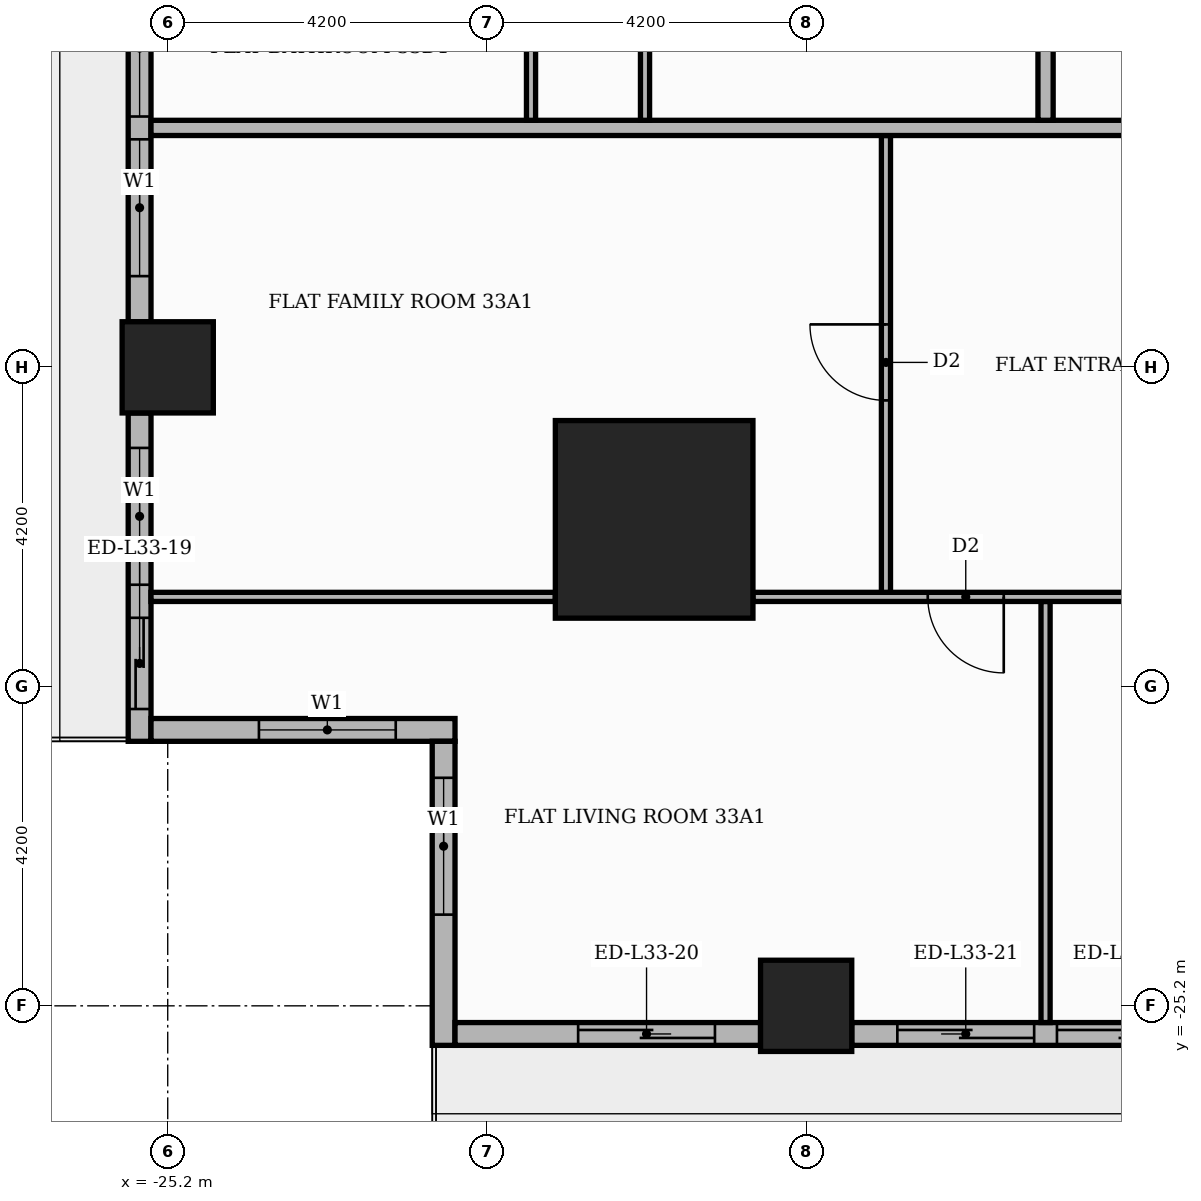
"""IFC4 building model, lengths in metres.
Left out: names, types, materials, properties, quantities, classifications, styles, units other than length and angle.
Written with IfcOpenShell. Run it as: python <this file> out.ifc"""

import sys

from ifc_helpers import new_model, si_unit, direction, frame, frame_2d, origin, origin_2d, place, context, subcontext, project, spatial, rectangle, extrude, element, fill, save


model = new_model("IFC4")
c1 = context("Model", 3, precision=1e-05, world=origin(), true_north=direction((0.0, 1.0)))
c2 = subcontext(c1, "Body", "Model", "MODEL_VIEW")
j1 = project(units=[si_unit("LENGTHUNIT", "METRE"), si_unit("PLANEANGLEUNIT", "RADIAN")], contexts=[c1])
p1 = place(None, origin())
s1 = spatial("IfcSite", under=j1, at=p1, CompositionType="ELEMENT")
p2 = place(p1, origin())
s2 = spatial("IfcBuilding", under=s1, at=p2, CompositionType="ELEMENT")
p3 = place(p2, frame((0.0, 0.0, 141.6)))
s3 = spatial("IfcBuildingStorey", under=s2, at=p3, CompositionType="ELEMENT", Elevation=141.6)
p4 = place(p3, frame((-18.8, -18.8, 0.0), z_axis=(0.0, 0.0, 1.0), x_axis=(1.0, 0.0, 0.0)))
e1 = element("IfcColumn", 1, at=p4, inside=s3, PredefinedType="COLUMN", context=c2, shape_type="SweptSolid", body=[
    extrude(rectangle(XDim=2.6, YDim=2.6, at=origin_2d()), origin(), (0.0, 0.0, 1.0), 3.9),
])
for number, where, z_axis, x_axis in (
    (2, (-16.8, -25.2, 0.0), (0.0, 0.0, 1.0), (1.0, 0.0, 0.0)),
    (3, (-25.2, -16.8, 0.0), (0.0, 0.0, 1.0), (1.0, 0.0, 0.0)),
):
    element("IfcColumn", number, at=place(p3, frame(where, z_axis=z_axis, x_axis=x_axis)), inside=s3, PredefinedType="COLUMN", context=c2, shape_type="SweptSolid", body=[
        extrude(rectangle(XDim=1.2, YDim=1.2, at=origin_2d()), origin(), (0.0, 0.0, 1.0), 3.9),
    ])
p5 = place(p3, frame((-25.57, -9.0, 0.0), z_axis=(0.0, 0.0, 1.0), x_axis=(0.0, -1.0, 0.0)))
e4 = element("IfcWall", 4, at=p5, inside=s3, PredefinedType="STANDARD", context=c2, shape_type="SweptSolid", body=[
    extrude(rectangle(XDim=7.2, YDim=0.3, at=frame_2d((3.6, 0.0))), origin(), (0.0, 0.0, 1.0), 3.48),
])
p6 = place(p5, frame((0.6, 0.0, 0.9)))
e5 = element("IfcOpeningElement", 5, at=p6, cuts=e4, PredefinedType="OPENING", context=c2, shape_type="SweptSolid", body=[
    extrude(rectangle(XDim=1.8, YDim=2.1, at=frame_2d((0.9, 1.05))), frame((0.0, 0.16, 0.0), z_axis=(0.0, -1.0, 0.0), x_axis=(1.0, 0.0, 0.0)), (0.0, 0.0, 1.0), 0.32),
])
p7 = place(p5, frame((2.7, 0.0, 0.9)))
e6 = element("IfcOpeningElement", 6, at=p7, cuts=e4, PredefinedType="OPENING", context=c2, shape_type="SweptSolid", body=[
    extrude(rectangle(XDim=1.8, YDim=2.1, at=frame_2d((0.9, 1.05))), frame((0.0, 0.16, 0.0), z_axis=(0.0, -1.0, 0.0), x_axis=(1.0, 0.0, 0.0)), (0.0, 0.0, 1.0), 0.32),
])
p8 = place(p5, frame((4.8, 0.0, 0.9)))
e7 = element("IfcOpeningElement", 7, at=p8, cuts=e4, PredefinedType="OPENING", context=c2, shape_type="SweptSolid", body=[
    extrude(rectangle(XDim=1.8, YDim=2.1, at=frame_2d((0.9, 1.05))), frame((0.0, 0.16, 0.0), z_axis=(0.0, -1.0, 0.0), x_axis=(1.0, 0.0, 0.0)), (0.0, 0.0, 1.0), 0.32),
])
p9 = place(p3, frame((-25.57, -17.4, 0.0), z_axis=(0.0, 0.0, 1.0), x_axis=(0.0, -1.0, 0.0)))
e8 = element("IfcWall", 8, at=p9, inside=s3, PredefinedType="STANDARD", context=c2, shape_type="SweptSolid", body=[
    extrude(rectangle(XDim=4.32, YDim=0.3, at=frame_2d((2.16, 0.0))), origin(), (0.0, 0.0, 1.0), 3.48),
])
p10 = place(p9, frame((2.695, 0.0, 0.0)))
e9 = element("IfcOpeningElement", 9, at=p10, cuts=e8, PredefinedType="OPENING", context=c2, shape_type="SweptSolid", body=[
    extrude(rectangle(XDim=1.2, YDim=2.4, at=frame_2d((0.6, 1.2))), frame((0.0, 0.16, 0.0), z_axis=(0.0, -1.0, 0.0), x_axis=(1.0, 0.0, 0.0)), (0.0, 0.0, 1.0), 0.32),
])
p11 = place(p9, frame((0.46, 0.0, 0.9)))
e10 = element("IfcOpeningElement", 10, at=p11, cuts=e8, PredefinedType="OPENING", context=c2, shape_type="SweptSolid", body=[
    extrude(rectangle(XDim=1.8, YDim=2.1, at=frame_2d((0.9, 1.05))), frame((0.0, 0.16, 0.0), z_axis=(0.0, -1.0, 0.0), x_axis=(1.0, 0.0, 0.0)), (0.0, 0.0, 1.0), 0.32),
])
p12 = place(p3, frame((-25.42, -21.57, 0.0), z_axis=(0.0, 0.0, 1.0), x_axis=(1.0, 0.0, 0.0)))
e11 = element("IfcWall", 11, at=p12, inside=s3, PredefinedType="STANDARD", context=c2, shape_type="SweptSolid", body=[
    extrude(rectangle(XDim=4.0, YDim=0.3, at=frame_2d((2.0, 0.0))), origin(), (0.0, 0.0, 1.0), 3.48),
])
p13 = place(p12, frame((1.42, 0.0, 0.9)))
e12 = element("IfcOpeningElement", 12, at=p13, cuts=e11, PredefinedType="OPENING", context=c2, shape_type="SweptSolid", body=[
    extrude(rectangle(XDim=1.8, YDim=2.1, at=frame_2d((0.9, 1.05))), frame((0.0, 0.16, 0.0), z_axis=(0.0, -1.0, 0.0), x_axis=(1.0, 0.0, 0.0)), (0.0, 0.0, 1.0), 0.32),
])
p14 = place(p3, frame((-21.57, -21.72, 0.0), z_axis=(0.0, 0.0, 1.0), x_axis=(0.0, -1.0, 0.0)))
e13 = element("IfcWall", 13, at=p14, inside=s3, PredefinedType="STANDARD", context=c2, shape_type="SweptSolid", body=[
    extrude(rectangle(XDim=4.0, YDim=0.3, at=frame_2d((2.0, 0.0))), origin(), (0.0, 0.0, 1.0), 3.48),
])
p15 = place(p14, frame((0.48, 0.0, 0.9)))
e14 = element("IfcOpeningElement", 14, at=p15, cuts=e13, PredefinedType="OPENING", context=c2, shape_type="SweptSolid", body=[
    extrude(rectangle(XDim=1.8, YDim=2.1, at=frame_2d((0.9, 1.05))), frame((0.0, 0.16, 0.0), z_axis=(0.0, -1.0, 0.0), x_axis=(1.0, 0.0, 0.0)), (0.0, 0.0, 1.0), 0.32),
])
p16 = place(p3, frame((-21.42, -25.57, 0.0), z_axis=(0.0, 0.0, 1.0), x_axis=(1.0, 0.0, 0.0)))
e15 = element("IfcWall", 15, at=p16, inside=s3, PredefinedType="STANDARD", context=c2, shape_type="SweptSolid", body=[
    extrude(rectangle(XDim=4.02, YDim=0.3, at=frame_2d((2.01, 0.0))), origin(), (0.0, 0.0, 1.0), 3.48),
])
p17 = place(p16, frame((1.62, 0.0, 0.0)))
e16 = element("IfcOpeningElement", 16, at=p17, cuts=e15, PredefinedType="OPENING", context=c2, shape_type="SweptSolid", body=[
    extrude(rectangle(XDim=1.8, YDim=2.4, at=frame_2d((0.9, 1.2))), frame((0.0, 0.16, 0.0), z_axis=(0.0, -1.0, 0.0), x_axis=(1.0, 0.0, 0.0)), (0.0, 0.0, 1.0), 0.32),
])
p18 = place(p3, frame((-16.2, -25.57, 0.0), z_axis=(0.0, 0.0, 1.0), x_axis=(1.0, 0.0, 0.0)))
e17 = element("IfcWall", 17, at=p18, inside=s3, PredefinedType="STANDARD", context=c2, shape_type="SweptSolid", body=[
    extrude(rectangle(XDim=7.2, YDim=0.3, at=frame_2d((3.6, 0.0))), origin(), (0.0, 0.0, 1.0), 3.48),
])
p19 = place(p18, frame((0.6, 0.0, 0.0)))
e18 = element("IfcOpeningElement", 18, at=p19, cuts=e17, PredefinedType="OPENING", context=c2, shape_type="SweptSolid", body=[
    extrude(rectangle(XDim=1.8, YDim=2.4, at=frame_2d((0.9, 1.2))), frame((0.0, 0.16, 0.0), z_axis=(0.0, -1.0, 0.0), x_axis=(1.0, 0.0, 0.0)), (0.0, 0.0, 1.0), 0.32),
])
p20 = place(p18, frame((2.7, 0.0, 0.0)))
e19 = element("IfcOpeningElement", 19, at=p20, cuts=e17, PredefinedType="OPENING", context=c2, shape_type="SweptSolid", body=[
    extrude(rectangle(XDim=1.8, YDim=2.4, at=frame_2d((0.9, 1.2))), frame((0.0, 0.16, 0.0), z_axis=(0.0, -1.0, 0.0), x_axis=(1.0, 0.0, 0.0)), (0.0, 0.0, 1.0), 0.32),
])
p21 = place(p18, frame((4.8, 0.0, 0.9)))
e20 = element("IfcOpeningElement", 20, at=p21, cuts=e17, PredefinedType="OPENING", context=c2, shape_type="SweptSolid", body=[
    extrude(rectangle(XDim=1.8, YDim=2.1, at=frame_2d((0.9, 1.05))), frame((0.0, 0.16, 0.0), z_axis=(0.0, -1.0, 0.0), x_axis=(1.0, 0.0, 0.0)), (0.0, 0.0, 1.0), 0.32),
])
p22 = place(p3, frame((-13.65, -25.42, 0.0), z_axis=(0.0, 0.0, 1.0), x_axis=(0.0, 1.0, 0.0)))
e21 = element("IfcWall", 21, at=p22, inside=s3, PredefinedType="PARTITIONING", context=c2, shape_type="SweptSolid", body=[
    extrude(rectangle(XDim=5.54, YDim=0.12, at=frame_2d((2.77, 0.0))), origin(), (0.0, 0.0, 1.0), 3.48),
])
p23 = place(p3, frame((-25.42, -19.82, 0.0), z_axis=(0.0, 0.0, 1.0), x_axis=(1.0, 0.0, 0.0)))
e22 = element("IfcWall", 22, at=p23, inside=s3, PredefinedType="PARTITIONING", context=c2, shape_type="SweptSolid", body=[
    extrude(rectangle(XDim=5.32, YDim=0.12, at=frame_2d((2.66, 0.0))), origin(), (0.0, 0.0, 1.0), 3.48),
])
p24 = place(p3, frame((-17.5, -19.82, 0.0), z_axis=(0.0, 0.0, 1.0), x_axis=(1.0, 0.0, 0.0)))
e23 = element("IfcWall", 23, at=p24, inside=s3, PredefinedType="PARTITIONING", context=c2, shape_type="SweptSolid", body=[
    extrude(rectangle(XDim=12.15, YDim=0.12, at=frame_2d((6.075, 0.0))), origin(), (0.0, 0.0, 1.0), 3.48),
])
p25 = place(p24, frame((2.3, 0.0, 0.0)))
e24 = element("IfcOpeningElement", 24, at=p25, cuts=e23, PredefinedType="OPENING", context=c2, shape_type="SweptSolid", body=[
    extrude(rectangle(XDim=1.0, YDim=2.1, at=frame_2d((0.5, 1.05))), frame((0.0, 0.07, 0.0), z_axis=(0.0, -1.0, 0.0), x_axis=(1.0, 0.0, 0.0)), (0.0, 0.0, 1.0), 0.14),
])
p26 = place(p24, frame((5.5, 0.0, 0.0)))
e25 = element("IfcOpeningElement", 25, at=p26, cuts=e23, PredefinedType="OPENING", context=c2, shape_type="SweptSolid", body=[
    extrude(rectangle(XDim=0.9, YDim=2.1, at=frame_2d((0.45, 1.05))), frame((0.0, 0.07, 0.0), z_axis=(0.0, -1.0, 0.0), x_axis=(1.0, 0.0, 0.0)), (0.0, 0.0, 1.0), 0.14),
])
p27 = place(p3, frame((-15.75, -19.76, 0.0), z_axis=(0.0, 0.0, 1.0), x_axis=(0.0, 1.0, 0.0)))
e26 = element("IfcWall", 26, at=p27, inside=s3, PredefinedType="PARTITIONING", context=c2, shape_type="SweptSolid", body=[
    extrude(rectangle(XDim=6.01, YDim=0.12, at=frame_2d((3.005, 0.0))), origin(), (0.0, 0.0, 1.0), 3.48),
])
p28 = place(p27, frame((2.525, 0.0, 0.0)))
e27 = element("IfcOpeningElement", 27, at=p28, cuts=e26, PredefinedType="OPENING", context=c2, shape_type="SweptSolid", body=[
    extrude(rectangle(XDim=1.0, YDim=2.1, at=frame_2d((0.5, 1.05))), frame((0.0, 0.07, 0.0), z_axis=(0.0, -1.0, 0.0), x_axis=(1.0, 0.0, 0.0)), (0.0, 0.0, 1.0), 0.14),
])
p29 = place(p3, frame((-25.42, -13.65, 0.0), z_axis=(0.0, 0.0, 1.0), x_axis=(1.0, 0.0, 0.0)))
e28 = element("IfcWall", 28, at=p29, inside=s3, PredefinedType="PARTITIONING", context=c2, shape_type="SweptSolid", body=[
    extrude(rectangle(XDim=39.07, YDim=0.2, at=frame_2d((19.535, 0.0))), origin(), (0.0, 0.0, 1.0), 3.48),
])
p30 = place(p29, frame((13.32, 0.0, 0.0)))
e29 = element("IfcOpeningElement", 29, at=p30, cuts=e28, PredefinedType="OPENING", context=c2, shape_type="SweptSolid", body=[
    extrude(rectangle(XDim=1.1, YDim=2.4, at=frame_2d((0.55, 1.2))), frame((0.0, 0.11, 0.0), z_axis=(0.0, -1.0, 0.0), x_axis=(1.0, 0.0, 0.0)), (0.0, 0.0, 1.0), 0.22),
])
p31 = place(p29, frame((25.92, 0.0, 0.0)))
e30 = element("IfcOpeningElement", 30, at=p31, cuts=e28, PredefinedType="OPENING", context=c2, shape_type="SweptSolid", body=[
    extrude(rectangle(XDim=1.1, YDim=2.4, at=frame_2d((0.55, 1.2))), frame((0.0, 0.11, 0.0), z_axis=(0.0, -1.0, 0.0), x_axis=(1.0, 0.0, 0.0)), (0.0, 0.0, 1.0), 0.22),
])
p32 = place(p3, frame((-20.42, -13.55, 0.0), z_axis=(0.0, 0.0, 1.0), x_axis=(0.0, 1.0, 0.0)))
e31 = element("IfcWall", 31, at=p32, inside=s3, PredefinedType="PARTITIONING", context=c2, shape_type="SweptSolid", body=[
    extrude(rectangle(XDim=1.94, YDim=0.12, at=frame_2d((0.97, 0.0))), origin(), (0.0, 0.0, 1.0), 3.48),
])
p33 = place(p3, frame((-18.92, -13.55, 0.0), z_axis=(0.0, 0.0, 1.0), x_axis=(0.0, 1.0, 0.0)))
e32 = element("IfcWall", 32, at=p33, inside=s3, PredefinedType="PARTITIONING", context=c2, shape_type="SweptSolid", body=[
    extrude(rectangle(XDim=4.04, YDim=0.12, at=frame_2d((2.02, 0.0))), origin(), (0.0, 0.0, 1.0), 3.48),
])
p34 = place(p33, frame((1.55, 0.0, 0.0)))
e33 = element("IfcOpeningElement", 33, at=p34, cuts=e32, PredefinedType="OPENING", context=c2, shape_type="SweptSolid", body=[
    extrude(rectangle(XDim=0.9, YDim=2.1, at=frame_2d((0.45, 1.05))), frame((0.0, 0.07, 0.0), z_axis=(0.0, -1.0, 0.0), x_axis=(1.0, 0.0, 0.0)), (0.0, 0.0, 1.0), 0.14),
])
p35 = place(p3, frame((-13.65, -13.55, 0.0), z_axis=(0.0, 0.0, 1.0), x_axis=(0.0, 1.0, 0.0)))
e34 = element("IfcWall", 34, at=p35, inside=s3, PredefinedType="PARTITIONING", context=c2, shape_type="SweptSolid", body=[
    extrude(rectangle(XDim=2.45, YDim=0.2, at=frame_2d((1.225, 0.0))), origin(), (0.0, 0.0, 1.0), 3.48),
])
p36 = place(p7, origin())
e35 = element("IfcWindow", 35, at=p36, inside=s3, PartitioningType="SINGLE_PANEL", PredefinedType="WINDOW", context=c2, shape_type="SweptSolid", body=[
    extrude(rectangle(XDim=1.8, YDim=2.1, at=frame_2d((0.9, 1.05))), frame((0.0, 0.03, 0.0), z_axis=(0.0, -1.0, 0.0), x_axis=(1.0, 0.0, 0.0)), (0.0, 0.0, 1.0), 0.06),
])
fill(e6, e35)
p37 = place(p8, origin())
e36 = element("IfcWindow", 36, at=p37, inside=s3, PartitioningType="SINGLE_PANEL", PredefinedType="WINDOW", context=c2, shape_type="SweptSolid", body=[
    extrude(rectangle(XDim=1.8, YDim=2.1, at=frame_2d((0.9, 1.05))), frame((0.0, 0.03, 0.0), z_axis=(0.0, -1.0, 0.0), x_axis=(1.0, 0.0, 0.0)), (0.0, 0.0, 1.0), 0.06),
])
fill(e7, e36)
p38 = place(p10, origin())
e37 = element("IfcDoor", 37, at=p38, inside=s3, OperationType="SLIDING_TO_LEFT", PredefinedType="DOOR", context=c2, shape_type="SweptSolid", body=[
    extrude(rectangle(XDim=1.2, YDim=2.4, at=frame_2d((0.6, 1.2))), frame((0.0, 0.025, 0.0), z_axis=(0.0, -1.0, 0.0), x_axis=(1.0, 0.0, 0.0)), (0.0, 0.0, 1.0), 0.05),
])
fill(e9, e37)
p39 = place(p11, origin())
e38 = element("IfcWindow", 38, at=p39, inside=s3, PartitioningType="SINGLE_PANEL", PredefinedType="WINDOW", context=c2, shape_type="SweptSolid", body=[
    extrude(rectangle(XDim=1.8, YDim=2.1, at=frame_2d((0.9, 1.05))), frame((0.0, 0.03, 0.0), z_axis=(0.0, -1.0, 0.0), x_axis=(1.0, 0.0, 0.0)), (0.0, 0.0, 1.0), 0.06),
])
fill(e10, e38)
p40 = place(p13, origin())
e39 = element("IfcWindow", 39, at=p40, inside=s3, PartitioningType="SINGLE_PANEL", PredefinedType="WINDOW", context=c2, shape_type="SweptSolid", body=[
    extrude(rectangle(XDim=1.8, YDim=2.1, at=frame_2d((0.9, 1.05))), frame((0.0, 0.03, 0.0), z_axis=(0.0, -1.0, 0.0), x_axis=(1.0, 0.0, 0.0)), (0.0, 0.0, 1.0), 0.06),
])
fill(e12, e39)
p41 = place(p15, origin())
e40 = element("IfcWindow", 40, at=p41, inside=s3, PartitioningType="SINGLE_PANEL", PredefinedType="WINDOW", context=c2, shape_type="SweptSolid", body=[
    extrude(rectangle(XDim=1.8, YDim=2.1, at=frame_2d((0.9, 1.05))), frame((0.0, 0.03, 0.0), z_axis=(0.0, -1.0, 0.0), x_axis=(1.0, 0.0, 0.0)), (0.0, 0.0, 1.0), 0.06),
])
fill(e14, e40)
p42 = place(p17, origin())
e41 = element("IfcDoor", 41, at=p42, inside=s3, OperationType="SLIDING_TO_RIGHT", PredefinedType="DOOR", context=c2, shape_type="SweptSolid", body=[
    extrude(rectangle(XDim=1.8, YDim=2.4, at=frame_2d((0.9, 1.2))), frame((0.0, 0.025, 0.0), z_axis=(0.0, -1.0, 0.0), x_axis=(1.0, 0.0, 0.0)), (0.0, 0.0, 1.0), 0.05),
])
fill(e16, e41)
p43 = place(p19, origin())
e42 = element("IfcDoor", 42, at=p43, inside=s3, OperationType="SLIDING_TO_LEFT", PredefinedType="DOOR", context=c2, shape_type="SweptSolid", body=[
    extrude(rectangle(XDim=1.8, YDim=2.4, at=frame_2d((0.9, 1.2))), frame((0.0, 0.025, 0.0), z_axis=(0.0, -1.0, 0.0), x_axis=(1.0, 0.0, 0.0)), (0.0, 0.0, 1.0), 0.05),
])
fill(e18, e42)
p44 = place(p20, origin())
e43 = element("IfcDoor", 43, at=p44, inside=s3, OperationType="SLIDING_TO_RIGHT", PredefinedType="DOOR", context=c2, shape_type="SweptSolid", body=[
    extrude(rectangle(XDim=1.8, YDim=2.4, at=frame_2d((0.9, 1.2))), frame((0.0, 0.025, 0.0), z_axis=(0.0, -1.0, 0.0), x_axis=(1.0, 0.0, 0.0)), (0.0, 0.0, 1.0), 0.05),
])
fill(e19, e43)
p45 = place(p28, origin())
e44 = element("IfcDoor", 44, at=p45, inside=s3, OperationType="SINGLE_SWING_RIGHT", PredefinedType="DOOR", context=c2, shape_type="SweptSolid", body=[
    extrude(rectangle(XDim=1.0, YDim=2.1, at=frame_2d((0.5, 1.05))), frame((0.0, 0.025, 0.0), z_axis=(0.0, -1.0, 0.0), x_axis=(1.0, 0.0, 0.0)), (0.0, 0.0, 1.0), 0.05),
])
fill(e27, e44)
p46 = place(p25, frame((1.0, 0.0, 0.0), z_axis=(0.0, 0.0, 1.0), x_axis=(-1.0, 0.0, 0.0)))
e45 = element("IfcDoor", 45, at=p46, inside=s3, OperationType="SINGLE_SWING_RIGHT", PredefinedType="DOOR", context=c2, shape_type="SweptSolid", body=[
    extrude(rectangle(XDim=1.0, YDim=2.1, at=frame_2d((0.5, 1.05))), frame((0.0, 0.025, 0.0), z_axis=(0.0, -1.0, 0.0), x_axis=(1.0, 0.0, 0.0)), (0.0, 0.0, 1.0), 0.05),
])
fill(e24, e45)
save(model, sys.argv[1])
